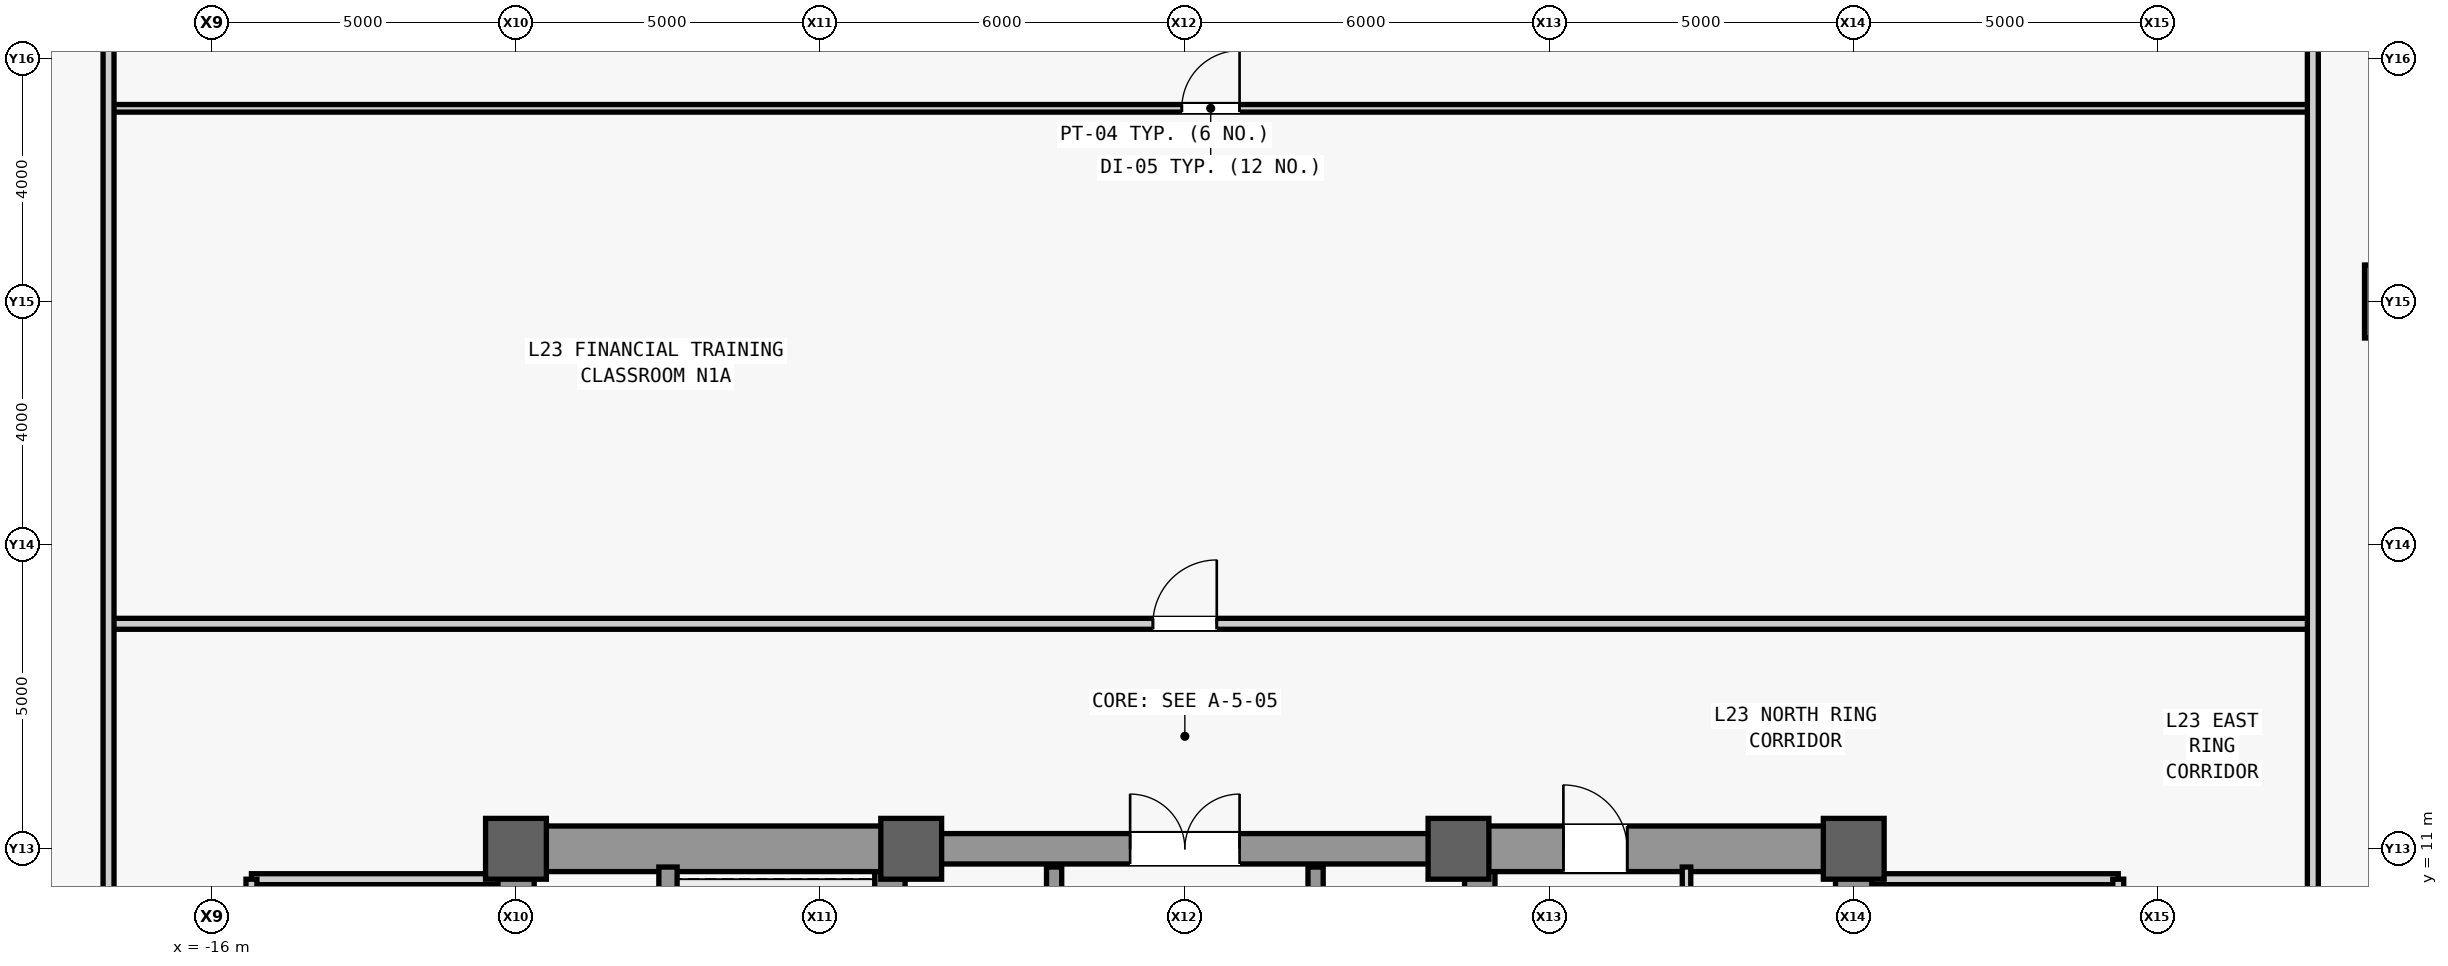
"""IFC4 building model, lengths in metres.
Left out: names, types, materials, properties, quantities, classifications, styles, units other than length and angle.
Written with IfcOpenShell. Run it as: python <this file> out.ifc"""

import sys

from ifc_helpers import new_model, si_unit, direction, frame, frame_2d, origin, origin_2d, place, context, subcontext, project, spatial, rectangle, hollow_rectangle, extrude, source, transform, mapped, element, fill, save


model = new_model("IFC4")
c1 = context("Model", 3, precision=1e-05, world=origin(), true_north=direction((0.0, 1.0)))
c2 = subcontext(c1, "Body", "Model", "MODEL_VIEW")
j1 = project(units=[si_unit("LENGTHUNIT", "METRE"), si_unit("PLANEANGLEUNIT", "RADIAN")], contexts=[c1])
p1 = place(None, origin())
s1 = spatial("IfcSite", under=j1, at=p1, CompositionType="ELEMENT")
p2 = place(p1, origin())
s2 = spatial("IfcBuilding", under=s1, at=p2, CompositionType="ELEMENT")
p3 = place(p2, frame((0.0, 0.0, 103.7)))
s3 = spatial("IfcBuildingStorey", under=s2, at=p3, CompositionType="ELEMENT", Elevation=103.7)
m1 = source(origin(), c2, "Body", "SweptSolid", [
    extrude(rectangle(XDim=22.0, YDim=0.6, at=frame_2d((11.0, 0.0))), origin(), (0.0, 0.0, 1.0), 3.84),
])
p4 = place(p3, frame((-11.0, -11.0, 0.0), z_axis=(0.0, 0.0, 1.0), x_axis=(0.0, 1.0, 0.0)))
e1 = element("IfcWall", 1, at=p4, inside=s3, PredefinedType="SHEAR", context=c2, shape_type="MappedRepresentation", body=[
    mapped(m1, transform((0.0, 0.0, 0.0), scale=1.0)),
])
m2 = source(origin(), c2, "Body", "SweptSolid", [
    extrude(rectangle(XDim=1.1, YDim=2.2, at=frame_2d((0.55, 1.1))), frame((0.0, 0.31, 0.0), z_axis=(0.0, -1.0, 0.0), x_axis=(1.0, 0.0, 0.0)), (0.0, 0.0, 1.0), 0.62),
])
p5 = place(p4, frame((0.8, 0.0, 0.0)))
e2 = element("IfcOpeningElement", 2, at=p5, cuts=e1, PredefinedType="OPENING", context=c2, shape_type="MappedRepresentation", body=[
    mapped(m2, transform((0.0, 0.0, 0.0), scale=1.0)),
])
p6 = place(p4, frame((12.5, 0.0, 0.0)))
e3 = element("IfcOpeningElement", 3, at=p6, cuts=e1, PredefinedType="OPENING", context=c2, shape_type="MappedRepresentation", body=[
    mapped(m2, transform((0.0, 0.0, 0.0), scale=1.0)),
])
m3 = source(origin(), c2, "Body", "SweptSolid", [
    extrude(rectangle(XDim=0.9, YDim=2.15, at=frame_2d((0.45, 1.075))), frame((0.0, 0.31, 0.0), z_axis=(0.0, -1.0, 0.0), x_axis=(1.0, 0.0, 0.0)), (0.0, 0.0, 1.0), 0.62),
])
p7 = place(p4, frame((6.2, 0.0, 0.0)))
e4 = element("IfcOpeningElement", 4, at=p7, cuts=e1, PredefinedType="OPENING", context=c2, shape_type="MappedRepresentation", body=[
    mapped(m3, transform((0.0, 0.0, 0.0), scale=1.0)),
])
p8 = place(p4, frame((8.525, 0.0, 0.0)))
e5 = element("IfcOpeningElement", 5, at=p8, cuts=e1, PredefinedType="OPENING", context=c2, shape_type="MappedRepresentation", body=[
    mapped(m3, transform((0.0, 0.0, 0.0), scale=1.0)),
])
m4 = source(origin(), c2, "Body", "SweptSolid", [
    extrude(rectangle(XDim=1.3, YDim=2.3, at=frame_2d((0.65, 1.15))), frame((0.0, 0.31, 0.0), z_axis=(0.0, -1.0, 0.0), x_axis=(1.0, 0.0, 0.0)), (0.0, 0.0, 1.0), 0.62),
])
p9 = place(p4, frame((2.7, 0.0, 0.0)))
e6 = element("IfcOpeningElement", 6, at=p9, cuts=e1, PredefinedType="OPENING", context=c2, shape_type="MappedRepresentation", body=[
    mapped(m4, transform((0.0, 0.0, 0.0), scale=1.0)),
])
p10 = place(p3, frame((11.0, -11.0, 0.0), z_axis=(0.0, 0.0, 1.0), x_axis=(0.0, 1.0, 0.0)))
e7 = element("IfcWall", 7, at=p10, inside=s3, PredefinedType="SHEAR", context=c2, shape_type="MappedRepresentation", body=[
    mapped(m1, transform((0.0, 0.0, 0.0), scale=1.0)),
])
p11 = place(p10, frame((0.8, 0.0, 0.0)))
e8 = element("IfcOpeningElement", 8, at=p11, cuts=e7, PredefinedType="OPENING", context=c2, shape_type="MappedRepresentation", body=[
    mapped(m2, transform((0.0, 0.0, 0.0), scale=1.0)),
])
p12 = place(p10, frame((6.2, 0.0, 0.0)))
e9 = element("IfcOpeningElement", 9, at=p12, cuts=e7, PredefinedType="OPENING", context=c2, shape_type="MappedRepresentation", body=[
    mapped(m3, transform((0.0, 0.0, 0.0), scale=1.0)),
])
p13 = place(p10, frame((8.525, 0.0, 0.0)))
e10 = element("IfcOpeningElement", 10, at=p13, cuts=e7, PredefinedType="OPENING", context=c2, shape_type="MappedRepresentation", body=[
    mapped(m3, transform((0.0, 0.0, 0.0), scale=1.0)),
])
p14 = place(p10, frame((2.7, 0.0, 0.0)))
e11 = element("IfcOpeningElement", 11, at=p14, cuts=e7, PredefinedType="OPENING", context=c2, shape_type="MappedRepresentation", body=[
    mapped(m4, transform((0.0, 0.0, 0.0), scale=1.0)),
])
p15 = place(p10, frame((13.35, 0.0, 0.0)))
e12 = element("IfcOpeningElement", 12, at=p15, cuts=e7, PredefinedType="OPENING", context=c2, shape_type="MappedRepresentation", body=[
    mapped(m4, transform((0.0, 0.0, 0.0), scale=1.0)),
])
m5 = source(origin(), c2, "Body", "SweptSolid", [
    extrude(rectangle(XDim=21.4, YDim=0.5, at=frame_2d((10.7, 0.0))), origin(), (0.0, 0.0, 1.0), 3.84),
])
for number, where, z_axis, x_axis in (
    (13, (-4.85, -10.7, 0.0), (0.0, 0.0, 1.0), (0.0, 1.0, 0.0)),
    (14, (4.85, -10.7, 0.0), (0.0, 0.0, 1.0), (0.0, 1.0, 0.0)),
):
    element("IfcWall", number, at=place(p3, frame(where, z_axis=z_axis, x_axis=x_axis)), inside=s3, PredefinedType="SHEAR", context=c2, shape_type="MappedRepresentation", body=[
        mapped(m5, transform((0.0, 0.0, 0.0), scale=1.0)),
    ])
m6 = source(origin(), c2, "Body", "SweptSolid", [
    extrude(rectangle(XDim=5.85, YDim=0.75, at=frame_2d((2.925, 0.0))), origin(), (0.0, 0.0, 1.0), 3.84),
])
p16 = place(p3, frame((-10.7, 11.0, 0.0), z_axis=(0.0, 0.0, 1.0), x_axis=(1.0, 0.0, 0.0)))
e15 = element("IfcWall", 15, at=p16, inside=s3, PredefinedType="SHEAR", context=c2, shape_type="MappedRepresentation", body=[
    mapped(m6, transform((0.0, 0.0, 0.0), scale=1.0)),
])
p17 = place(p3, frame((4.85, 11.0, 0.0), z_axis=(0.0, 0.0, 1.0), x_axis=(1.0, 0.0, 0.0)))
e16 = element("IfcWall", 16, at=p17, inside=s3, PredefinedType="SHEAR", context=c2, shape_type="MappedRepresentation", body=[
    mapped(m6, transform((0.0, 0.0, 0.0), scale=1.0)),
])
m7 = source(origin(), c2, "Body", "SweptSolid", [
    extrude(rectangle(XDim=1.05, YDim=2.2, at=frame_2d((0.525, 1.1))), frame((0.0, 0.385, 0.0), z_axis=(0.0, -1.0, 0.0), x_axis=(1.0, 0.0, 0.0)), (0.0, 0.0, 1.0), 0.77),
])
p18 = place(p17, frame((1.375, 0.0, 0.0)))
e17 = element("IfcOpeningElement", 17, at=p18, cuts=e16, PredefinedType="OPENING", context=c2, shape_type="MappedRepresentation", body=[
    mapped(m7, transform((0.0, 0.0, 0.0), scale=1.0)),
])
m8 = source(origin(), c2, "Body", "SweptSolid", [
    extrude(rectangle(XDim=9.2, YDim=0.5, at=frame_2d((4.6, 0.0))), origin(), (0.0, 0.0, 1.0), 3.84),
])
p19 = place(p3, frame((-4.6, 11.0, 0.0), z_axis=(0.0, 0.0, 1.0), x_axis=(1.0, 0.0, 0.0)))
e18 = element("IfcWall", 18, at=p19, inside=s3, PredefinedType="SHEAR", context=c2, shape_type="MappedRepresentation", body=[
    mapped(m8, transform((0.0, 0.0, 0.0), scale=1.0)),
])
m9 = source(origin(), c2, "Body", "SweptSolid", [
    extrude(rectangle(XDim=1.8, YDim=2.25, at=frame_2d((0.9, 1.125))), frame((0.0, 0.26, 0.0), z_axis=(0.0, -1.0, 0.0), x_axis=(1.0, 0.0, 0.0)), (0.0, 0.0, 1.0), 0.52),
])
p20 = place(p19, frame((3.7, 0.0, 0.0)))
e19 = element("IfcOpeningElement", 19, at=p20, cuts=e18, PredefinedType="OPENING", context=c2, shape_type="MappedRepresentation", body=[
    mapped(m9, transform((0.0, 0.0, 0.0), scale=1.0)),
])
m10 = source(origin(), c2, "Body", "SweptSolid", [
    extrude(rectangle(XDim=1.0, YDim=1.0, at=origin_2d()), origin(), (0.0, 0.0, 1.0), 4.1),
])
for number, where, z_axis, x_axis in (
    (20, (-11.0, 11.0, 0.0), (0.0, 0.0, 1.0), (1.0, 0.0, 0.0)),
    (21, (-4.5, 11.0, 0.0), (0.0, 0.0, 1.0), (1.0, 0.0, 0.0)),
    (22, (4.5, 11.0, 0.0), (0.0, 0.0, 1.0), (1.0, 0.0, 0.0)),
    (23, (11.0, 11.0, 0.0), (0.0, 0.0, 1.0), (1.0, 0.0, 0.0)),
):
    element("IfcColumn", number, at=place(p3, frame(where, z_axis=z_axis, x_axis=x_axis)), inside=s3, PredefinedType="COLUMN", context=c2, shape_type="MappedRepresentation", body=[
        mapped(m10, transform((0.0, 0.0, 0.0), scale=1.0)),
    ])
m11 = source(origin(), c2, "Body", "SweptSolid", [
    extrude(hollow_rectangle(XDim=1.2, YDim=1.2, WallThickness=0.07, at=origin_2d()), origin(), (0.0, 0.0, 1.0), 4.1),
])
p21 = place(p3, frame((20.0, 20.0, 0.0), z_axis=(0.0, 0.0, 1.0), x_axis=(1.0, 0.0, 0.0)))
e24 = element("IfcColumn", 24, at=p21, inside=s3, PredefinedType="COLUMN", context=c2, shape_type="MappedRepresentation", body=[
    mapped(m11, transform((0.0, 0.0, 0.0), scale=1.0)),
])
m12 = source(origin(), c2, "Body", "SweptSolid", [
    extrude(rectangle(XDim=7.75, YDim=0.3, at=frame_2d((3.875, 0.0))), origin(), (0.0, 0.0, 1.0), 3.84),
])
p22 = place(p3, frame((-8.5, 2.95, 0.0), z_axis=(0.0, 0.0, 1.0), x_axis=(0.0, 1.0, 0.0)))
e25 = element("IfcWall", 25, at=p22, inside=s3, PredefinedType="SHEAR", context=c2, shape_type="MappedRepresentation", body=[
    mapped(m12, transform((0.0, 0.0, 0.0), scale=1.0)),
])
m13 = source(origin(), c2, "Body", "SweptSolid", [
    extrude(rectangle(XDim=9.4, YDim=0.14, at=frame_2d((4.7, 0.0))), origin(), (0.0, 0.0, 1.0), 3.84),
])
p23 = place(p3, frame((8.25, 1.3, 0.0), z_axis=(0.0, 0.0, 1.0), x_axis=(0.0, 1.0, 0.0)))
e26 = element("IfcWall", 26, at=p23, inside=s3, PredefinedType="PARTITIONING", context=c2, shape_type="MappedRepresentation", body=[
    mapped(m13, transform((0.0, 0.0, 0.0), scale=1.0)),
])
m14 = source(origin(), c2, "Body", "SweptSolid", [
    extrude(rectangle(XDim=4.05, YDim=0.18, at=frame_2d((2.025, 0.0))), origin(), (0.0, 0.0, 1.0), 3.84),
])
p24 = place(p3, frame((-15.35, 10.5, 0.0), z_axis=(0.0, 0.0, 1.0), x_axis=(1.0, 0.0, 0.0)))
e27 = element("IfcWall", 27, at=p24, inside=s3, PredefinedType="PARTITIONING", context=c2, shape_type="MappedRepresentation", body=[
    mapped(m14, transform((0.0, 0.0, 0.0), scale=1.0)),
])
m15 = source(origin(), c2, "Body", "SweptSolid", [
    extrude(rectangle(XDim=16.6, YDim=0.18, at=frame_2d((8.3, 0.0))), origin(), (0.0, 0.0, 1.0), 3.84),
])
p25 = place(p3, frame((-15.35, -6.1, 0.0), z_axis=(0.0, 0.0, 1.0), x_axis=(0.0, 1.0, 0.0)))
e28 = element("IfcWall", 28, at=p25, inside=s3, PredefinedType="PARTITIONING", context=c2, shape_type="MappedRepresentation", body=[
    mapped(m15, transform((0.0, 0.0, 0.0), scale=1.0)),
])
m16 = source(origin(), c2, "Body", "SweptSolid", [
    extrude(rectangle(XDim=1.8, YDim=2.25, at=frame_2d((0.9, 1.125))), frame((0.0, 0.1, 0.0), z_axis=(0.0, -1.0, 0.0), x_axis=(1.0, 0.0, 0.0)), (0.0, 0.0, 1.0), 0.2),
])
p26 = place(p25, frame((2.7, 0.0, 0.0)))
e29 = element("IfcOpeningElement", 29, at=p26, cuts=e28, PredefinedType="OPENING", context=c2, shape_type="MappedRepresentation", body=[
    mapped(m16, transform((0.0, 0.0, 0.0), scale=1.0)),
])
p27 = place(p25, frame((11.0, 0.0, 0.0)))
e30 = element("IfcOpeningElement", 30, at=p27, cuts=e28, PredefinedType="OPENING", context=c2, shape_type="MappedRepresentation", body=[
    mapped(m16, transform((0.0, 0.0, 0.0), scale=1.0)),
])
p28 = place(p3, frame((11.3, 10.5, 0.0), z_axis=(0.0, 0.0, 1.0), x_axis=(1.0, 0.0, 0.0)))
e31 = element("IfcWall", 31, at=p28, inside=s3, PredefinedType="PARTITIONING", context=c2, shape_type="MappedRepresentation", body=[
    mapped(m14, transform((0.0, 0.0, 0.0), scale=1.0)),
])
p29 = place(p3, frame((15.35, -6.1, 0.0), z_axis=(0.0, 0.0, 1.0), x_axis=(0.0, 1.0, 0.0)))
e32 = element("IfcWall", 32, at=p29, inside=s3, PredefinedType="PARTITIONING", context=c2, shape_type="MappedRepresentation", body=[
    mapped(m15, transform((0.0, 0.0, 0.0), scale=1.0)),
])
p30 = place(p29, frame((2.7, 0.0, 0.0)))
e33 = element("IfcOpeningElement", 33, at=p30, cuts=e32, PredefinedType="OPENING", context=c2, shape_type="MappedRepresentation", body=[
    mapped(m16, transform((0.0, 0.0, 0.0), scale=1.0)),
])
p31 = place(p29, frame((13.0, 0.0, 0.0)))
e34 = element("IfcOpeningElement", 34, at=p31, cuts=e32, PredefinedType="OPENING", context=c2, shape_type="MappedRepresentation", body=[
    mapped(m16, transform((0.0, 0.0, 0.0), scale=1.0)),
])
m17 = source(origin(), c2, "Body", "SweptSolid", [
    extrude(rectangle(XDim=5.4, YDim=0.25, at=frame_2d((2.7, 0.0))), origin(), (0.0, 0.0, 1.0), 3.84),
])
for number, where, z_axis, x_axis in (
    (35, (-2.15, 5.3, 0.0), (0.0, 0.0, 1.0), (0.0, 1.0, 0.0)),
    (36, (2.15, 5.3, 0.0), (0.0, 0.0, 1.0), (0.0, 1.0, 0.0)),
):
    element("IfcWall", number, at=place(p3, frame(where, z_axis=z_axis, x_axis=x_axis)), inside=s3, PredefinedType="SHEAR", context=c2, shape_type="MappedRepresentation", body=[
        mapped(m17, transform((0.0, 0.0, 0.0), scale=1.0)),
    ])
m18 = source(origin(), c2, "Body", "SweptSolid", [
    extrude(rectangle(XDim=36.25, YDim=0.125, at=frame_2d((18.125, 0.0))), origin(), (0.0, 0.0, 1.0), 3.84),
])
p32 = place(p3, frame((-17.7, 23.177, 0.0), z_axis=(0.0, 0.0, 1.0), x_axis=(1.0, 0.0, 0.0)))
e37 = element("IfcWall", 37, at=p32, inside=s3, PredefinedType="PARTITIONING", context=c2, shape_type="MappedRepresentation", body=[
    mapped(m18, transform((0.0, 0.0, 0.0), scale=1.0)),
])
m19 = source(origin(), c2, "Body", "SweptSolid", [
    extrude(rectangle(XDim=0.95, YDim=2.15, at=frame_2d((0.475, 1.075))), frame((0.0, 0.073, 0.0), z_axis=(0.0, -1.0, 0.0), x_axis=(1.0, 0.0, 0.0)), (0.0, 0.0, 1.0), 0.145),
])
p33 = place(p32, frame((17.65, 0.0, 0.0)))
e38 = element("IfcOpeningElement", 38, at=p33, cuts=e37, PredefinedType="OPENING", context=c2, shape_type="MappedRepresentation", body=[
    mapped(m19, transform((0.0, 0.0, 0.0), scale=1.0)),
])
m20 = source(origin(), c2, "Body", "SweptSolid", [
    extrude(rectangle(XDim=36.25, YDim=0.18, at=frame_2d((18.125, 0.0))), origin(), (0.0, 0.0, 1.0), 3.84),
])
p34 = place(p3, frame((-17.7, 14.7, 0.0), z_axis=(0.0, 0.0, 1.0), x_axis=(1.0, 0.0, 0.0)))
e39 = element("IfcWall", 39, at=p34, inside=s3, PredefinedType="PARTITIONING", context=c2, shape_type="MappedRepresentation", body=[
    mapped(m20, transform((0.0, 0.0, 0.0), scale=1.0)),
])
m21 = source(origin(), c2, "Body", "SweptSolid", [
    extrude(rectangle(XDim=1.05, YDim=2.2, at=frame_2d((0.525, 1.1))), frame((0.0, 0.1, 0.0), z_axis=(0.0, -1.0, 0.0), x_axis=(1.0, 0.0, 0.0)), (0.0, 0.0, 1.0), 0.2),
])
p35 = place(p34, frame((17.175, 0.0, 0.0)))
e40 = element("IfcOpeningElement", 40, at=p35, cuts=e39, PredefinedType="OPENING", context=c2, shape_type="MappedRepresentation", body=[
    mapped(m21, transform((0.0, 0.0, 0.0), scale=1.0)),
])
m22 = source(origin(), c2, "Body", "SweptSolid", [
    extrude(rectangle(XDim=56.0, YDim=0.18, at=frame_2d((28.0, 0.0))), origin(), (0.0, 0.0, 1.0), 3.84),
])
p36 = place(p3, frame((-17.7, -28.0, 0.0), z_axis=(0.0, 0.0, 1.0), x_axis=(0.0, 1.0, 0.0)))
e41 = element("IfcWall", 41, at=p36, inside=s3, PredefinedType="PARTITIONING", context=c2, shape_type="MappedRepresentation", body=[
    mapped(m22, transform((0.0, 0.0, 0.0), scale=1.0)),
])
m23 = source(origin(), c2, "Body", "SweptSolid", [
    extrude(rectangle(XDim=0.95, YDim=2.15, at=frame_2d((0.475, 1.075))), frame((0.0, 0.1, 0.0), z_axis=(0.0, -1.0, 0.0), x_axis=(1.0, 0.0, 0.0)), (0.0, 0.0, 1.0), 0.2),
])
p37 = place(p36, frame((20.593, 0.0, 0.0)))
e42 = element("IfcOpeningElement", 42, at=p37, cuts=e41, PredefinedType="OPENING", context=c2, shape_type="MappedRepresentation", body=[
    mapped(m23, transform((0.0, 0.0, 0.0), scale=1.0)),
])
p38 = place(p36, frame((34.143, 0.0, 0.0)))
e43 = element("IfcOpeningElement", 43, at=p38, cuts=e41, PredefinedType="OPENING", context=c2, shape_type="MappedRepresentation", body=[
    mapped(m23, transform((0.0, 0.0, 0.0), scale=1.0)),
])
p39 = place(p3, frame((18.55, -28.0, 0.0), z_axis=(0.0, 0.0, 1.0), x_axis=(0.0, 1.0, 0.0)))
e44 = element("IfcWall", 44, at=p39, inside=s3, PredefinedType="PARTITIONING", context=c2, shape_type="MappedRepresentation", body=[
    mapped(m22, transform((0.0, 0.0, 0.0), scale=1.0)),
])
p40 = place(p39, frame((19.036, 0.0, 0.0)))
e45 = element("IfcOpeningElement", 45, at=p40, cuts=e44, PredefinedType="OPENING", context=c2, shape_type="MappedRepresentation", body=[
    mapped(m23, transform((0.0, 0.0, 0.0), scale=1.0)),
])
p41 = place(p39, frame((28.358, 0.0, 0.0)))
e46 = element("IfcOpeningElement", 46, at=p41, cuts=e44, PredefinedType="OPENING", context=c2, shape_type="MappedRepresentation", body=[
    mapped(m23, transform((0.0, 0.0, 0.0), scale=1.0)),
])
p42 = place(p39, frame((37.397, 0.0, 0.0)))
e47 = element("IfcOpeningElement", 47, at=p42, cuts=e44, PredefinedType="OPENING", context=c2, shape_type="MappedRepresentation", body=[
    mapped(m23, transform((0.0, 0.0, 0.0), scale=1.0)),
])
m24 = source(origin(), c2, "Body", "SweptSolid", [
    extrude(rectangle(XDim=1.05, YDim=2.2, at=frame_2d((0.525, 1.1))), frame((0.0, 0.025, 0.0), z_axis=(0.0, -1.0, 0.0), x_axis=(1.0, 0.0, 0.0)), (0.0, 0.0, 1.0), 0.05),
])
p43 = place(p18, origin())
e48 = element("IfcDoor", 48, at=p43, inside=s3, OperationType="SINGLE_SWING_LEFT", PredefinedType="DOOR", context=c2, shape_type="MappedRepresentation", body=[
    mapped(m24, transform((0.0, 0.0, 0.0), scale=1.0)),
])
fill(e17, e48)
m25 = source(origin(), c2, "Body", "SweptSolid", [
    extrude(rectangle(XDim=1.8, YDim=2.25, at=frame_2d((0.9, 1.125))), frame((0.0, 0.025, 0.0), z_axis=(0.0, -1.0, 0.0), x_axis=(1.0, 0.0, 0.0)), (0.0, 0.0, 1.0), 0.05),
])
p44 = place(p20, origin())
e49 = element("IfcDoor", 49, at=p44, inside=s3, OperationType="SINGLE_SWING_RIGHT", PredefinedType="DOOR", context=c2, shape_type="MappedRepresentation", body=[
    mapped(m25, transform((0.0, 0.0, 0.0), scale=1.0)),
])
fill(e19, e49)
m26 = source(origin(), c2, "Body", "SweptSolid", [
    extrude(rectangle(XDim=0.95, YDim=2.15, at=frame_2d((0.475, 1.075))), frame((0.0, 0.025, 0.0), z_axis=(0.0, -1.0, 0.0), x_axis=(1.0, 0.0, 0.0)), (0.0, 0.0, 1.0), 0.05),
])
p45 = place(p33, origin())
e50 = element("IfcDoor", 50, at=p45, inside=s3, OperationType="SINGLE_SWING_RIGHT", PredefinedType="DOOR", context=c2, shape_type="MappedRepresentation", body=[
    mapped(m26, transform((0.0, 0.0, 0.0), scale=1.0)),
])
fill(e38, e50)
p46 = place(p35, origin())
e51 = element("IfcDoor", 51, at=p46, inside=s3, OperationType="SINGLE_SWING_RIGHT", PredefinedType="DOOR", context=c2, shape_type="MappedRepresentation", body=[
    mapped(m24, transform((0.0, 0.0, 0.0), scale=1.0)),
])
fill(e40, e51)
save(model, sys.argv[1])
